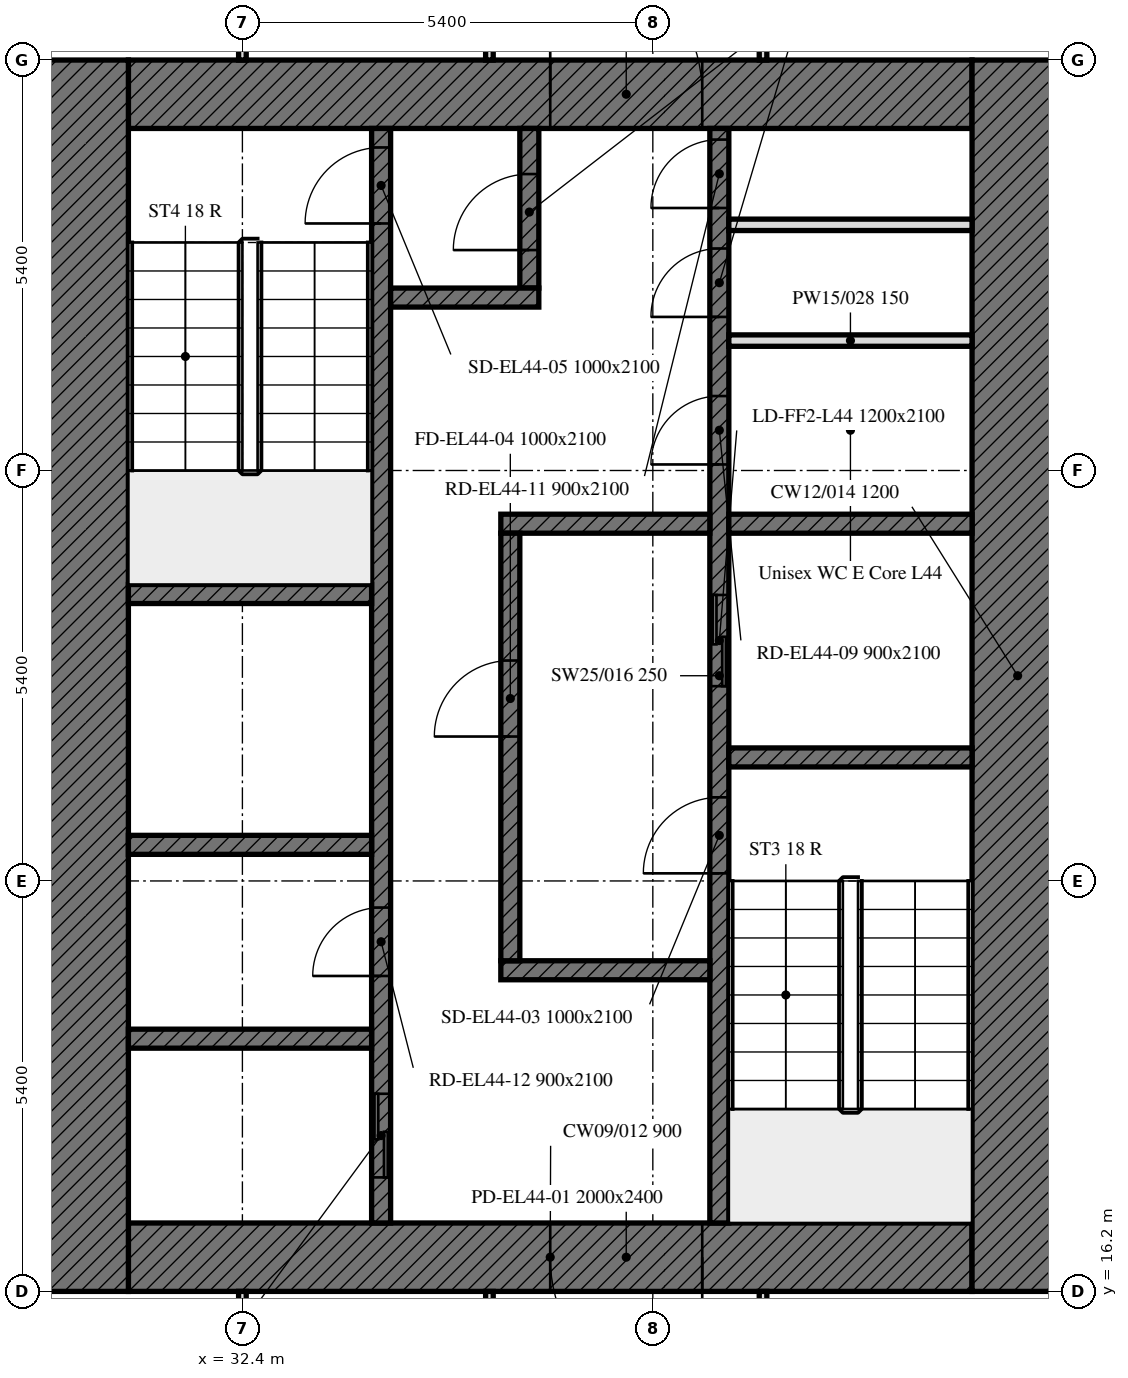
"""IFC4 building model, lengths in metres.
Left out: names, types, materials, properties, quantities, classifications, styles, units other than length and angle.
Written with IfcOpenShell. Run it as: python <this file> out.ifc"""

import sys

from ifc_helpers import new_model, si_unit, direction, frame, frame_2d, origin, place, context, subcontext, project, spatial, rectangle, extrude, element, fill, save


model = new_model("IFC4")
c1 = context("Model", 3, precision=1e-05, world=origin(), true_north=direction((0.0, 1.0)))
c2 = subcontext(c1, "Body", "Model", "MODEL_VIEW")
j1 = project(units=[si_unit("LENGTHUNIT", "METRE"), si_unit("PLANEANGLEUNIT", "RADIAN")], contexts=[c1])
p1 = place(None, origin())
s1 = spatial("IfcSite", under=j1, at=p1, CompositionType="ELEMENT")
p2 = place(p1, origin())
s2 = spatial("IfcBuilding", under=s1, at=p2, CompositionType="ELEMENT")
p3 = place(p2, frame((0.0, 0.0, 184.0)))
s3 = spatial("IfcBuildingStorey", under=s2, at=p3, CompositionType="ELEMENT", Elevation=184.0)
p4 = place(p3, frame((42.0, 16.65, 0.0), z_axis=(0.0, 0.0, 1.0), x_axis=(-1.0, 0.0, 0.0)))
e1 = element("IfcWall", 1, at=p4, inside=s3, PredefinedType="SOLIDWALL", context=c2, shape_type="SweptSolid", body=[
    extrude(rectangle(XDim=11.1, YDim=0.9, at=frame_2d((5.55, 0.0))), origin(), (0.0, 0.0, 1.0), 3.0),
])
p5 = place(p4, frame((3.55, 0.0, 0.0)))
e2 = element("IfcOpeningElement", 2, at=p5, cuts=e1, PredefinedType="OPENING", context=c2, shape_type="SweptSolid", body=[
    extrude(rectangle(XDim=2.0, YDim=2.4, at=frame_2d((1.0, 1.2))), frame((0.0, 0.45, 0.0), z_axis=(0.0, -1.0, 0.0), x_axis=(1.0, 0.0, 0.0)), (0.0, 0.0, 1.0), 0.9),
])
p6 = place(p3, frame((30.9, 31.95, 0.0), z_axis=(0.0, 0.0, 1.0), x_axis=(1.0, 0.0, 0.0)))
e3 = element("IfcWall", 3, at=p6, inside=s3, PredefinedType="SOLIDWALL", context=c2, shape_type="SweptSolid", body=[
    extrude(rectangle(XDim=11.1, YDim=0.9, at=frame_2d((5.55, 0.0))), origin(), (0.0, 0.0, 1.0), 3.0),
])
p7 = place(p6, frame((5.55, 0.0, 0.0)))
e4 = element("IfcOpeningElement", 4, at=p7, cuts=e3, PredefinedType="OPENING", context=c2, shape_type="SweptSolid", body=[
    extrude(rectangle(XDim=2.0, YDim=2.4, at=frame_2d((1.0, 1.2))), frame((0.0, 0.45, 0.0), z_axis=(0.0, -1.0, 0.0), x_axis=(1.0, 0.0, 0.0)), (0.0, 0.0, 1.0), 0.9),
])
for number, where, z_axis, x_axis in (
    (5, (42.6, 32.4, 0.0), (0.0, 0.0, 1.0), (0.0, -1.0, 0.0)),
    (6, (30.3, 16.2, 0.0), (0.0, 0.0, 1.0), (0.0, 1.0, 0.0)),
):
    element("IfcWall", number, at=place(p3, frame(where, z_axis=z_axis, x_axis=x_axis)), inside=s3, PredefinedType="SOLIDWALL", context=c2, shape_type="SweptSolid", body=[
        extrude(rectangle(XDim=16.2, YDim=1.2, at=frame_2d((8.1, 0.0))), origin(), (0.0, 0.0, 1.0), 3.0),
    ])
p8 = place(p3, frame((38.675, 17.1, 0.0), z_axis=(0.0, 0.0, 1.0), x_axis=(0.0, 1.0, 0.0)))
e7 = element("IfcWall", 7, at=p8, inside=s3, PredefinedType="SOLIDWALL", context=c2, shape_type="SweptSolid", body=[
    extrude(rectangle(XDim=14.4, YDim=0.25, at=frame_2d((7.2, 0.0))), origin(), (0.0, 0.0, 1.0), 3.0),
])
p9 = place(p8, frame((4.6, 0.0, 0.0)))
e8 = element("IfcOpeningElement", 8, at=p9, cuts=e7, PredefinedType="OPENING", context=c2, shape_type="SweptSolid", body=[
    extrude(rectangle(XDim=1.0, YDim=2.1, at=frame_2d((0.5, 1.05))), frame((0.0, 0.125, 0.0), z_axis=(0.0, -1.0, 0.0), x_axis=(1.0, 0.0, 0.0)), (0.0, 0.0, 1.0), 0.25),
])
p10 = place(p8, frame((7.062, 0.0, 0.0)))
e9 = element("IfcOpeningElement", 9, at=p10, cuts=e7, PredefinedType="OPENING", context=c2, shape_type="SweptSolid", body=[
    extrude(rectangle(XDim=1.2, YDim=2.1, at=frame_2d((0.6, 1.05))), frame((0.0, 0.125, 0.0), z_axis=(0.0, -1.0, 0.0), x_axis=(1.0, 0.0, 0.0)), (0.0, 0.0, 1.0), 0.25),
])
p11 = place(p8, frame((9.979, 0.0, 0.0)))
e10 = element("IfcOpeningElement", 10, at=p11, cuts=e7, PredefinedType="OPENING", context=c2, shape_type="SweptSolid", body=[
    extrude(rectangle(XDim=0.9, YDim=2.1, at=frame_2d((0.45, 1.05))), frame((0.0, 0.125, 0.0), z_axis=(0.0, -1.0, 0.0), x_axis=(1.0, 0.0, 0.0)), (0.0, 0.0, 1.0), 0.25),
])
p12 = place(p8, frame((11.92, 0.0, 0.0)))
e11 = element("IfcOpeningElement", 11, at=p12, cuts=e7, PredefinedType="OPENING", context=c2, shape_type="SweptSolid", body=[
    extrude(rectangle(XDim=0.9, YDim=2.1, at=frame_2d((0.45, 1.05))), frame((0.0, 0.125, 0.0), z_axis=(0.0, -1.0, 0.0), x_axis=(1.0, 0.0, 0.0)), (0.0, 0.0, 1.0), 0.25),
])
p13 = place(p8, frame((13.354, 0.0, 0.0)))
e12 = element("IfcOpeningElement", 12, at=p13, cuts=e7, PredefinedType="OPENING", context=c2, shape_type="SweptSolid", body=[
    extrude(rectangle(XDim=0.9, YDim=2.1, at=frame_2d((0.45, 1.05))), frame((0.0, 0.125, 0.0), z_axis=(0.0, -1.0, 0.0), x_axis=(1.0, 0.0, 0.0)), (0.0, 0.0, 1.0), 0.25),
])
p14 = place(p3, frame((34.225, 17.1, 0.0), z_axis=(0.0, 0.0, 1.0), x_axis=(0.0, 1.0, 0.0)))
e13 = element("IfcWall", 13, at=p14, inside=s3, PredefinedType="SOLIDWALL", context=c2, shape_type="SweptSolid", body=[
    extrude(rectangle(XDim=14.4, YDim=0.25, at=frame_2d((7.2, 0.0))), origin(), (0.0, 0.0, 1.0), 3.0),
])
p15 = place(p14, frame((13.15, 0.0, 0.0)))
e14 = element("IfcOpeningElement", 14, at=p15, cuts=e13, PredefinedType="OPENING", context=c2, shape_type="SweptSolid", body=[
    extrude(rectangle(XDim=1.0, YDim=2.1, at=frame_2d((0.5, 1.05))), frame((0.0, 0.125, 0.0), z_axis=(0.0, -1.0, 0.0), x_axis=(1.0, 0.0, 0.0)), (0.0, 0.0, 1.0), 0.25),
])
p16 = place(p14, frame((0.6, 0.0, 0.0)))
e15 = element("IfcOpeningElement", 15, at=p16, cuts=e13, PredefinedType="OPENING", context=c2, shape_type="SweptSolid", body=[
    extrude(rectangle(XDim=1.1, YDim=2.1, at=frame_2d((0.55, 1.05))), frame((0.0, 0.125, 0.0), z_axis=(0.0, -1.0, 0.0), x_axis=(1.0, 0.0, 0.0)), (0.0, 0.0, 1.0), 0.25),
])
p17 = place(p14, frame((3.25, 0.0, 0.0)))
e16 = element("IfcOpeningElement", 16, at=p17, cuts=e13, PredefinedType="OPENING", context=c2, shape_type="SweptSolid", body=[
    extrude(rectangle(XDim=0.9, YDim=2.1, at=frame_2d((0.45, 1.05))), frame((0.0, 0.125, 0.0), z_axis=(0.0, -1.0, 0.0), x_axis=(1.0, 0.0, 0.0)), (0.0, 0.0, 1.0), 0.25),
])
p18 = place(p3, frame((38.8, 23.225, 0.0), z_axis=(0.0, 0.0, 1.0), x_axis=(1.0, 0.0, 0.0)))
e17 = element("IfcWall", 17, at=p18, inside=s3, PredefinedType="SOLIDWALL", context=c2, shape_type="SweptSolid", body=[
    extrude(rectangle(XDim=3.2, YDim=0.25, at=frame_2d((1.6, 0.0))), origin(), (0.0, 0.0, 1.0), 3.0),
])
for number, where, z_axis, x_axis in (
    (18, (30.9, 25.375, 0.0), (0.0, 0.0, 1.0), (1.0, 0.0, 0.0)),
    (19, (30.9, 22.075, 0.0), (0.0, 0.0, 1.0), (1.0, 0.0, 0.0)),
):
    element("IfcWall", number, at=place(p3, frame(where, z_axis=z_axis, x_axis=x_axis)), inside=s3, PredefinedType="SOLIDWALL", context=c2, shape_type="SweptSolid", body=[
        extrude(rectangle(XDim=3.2, YDim=0.25, at=frame_2d((1.6, 0.0))), origin(), (0.0, 0.0, 1.0), 3.0),
    ])
p19 = place(p3, frame((38.8, 26.3, 0.0), z_axis=(0.0, 0.0, 1.0), x_axis=(1.0, 0.0, 0.0)))
e20 = element("IfcWall", 20, at=p19, inside=s3, PredefinedType="SOLIDWALL", context=c2, shape_type="SweptSolid", body=[
    extrude(rectangle(XDim=3.2, YDim=0.25, at=frame_2d((1.6, 0.0))), origin(), (0.0, 0.0, 1.0), 3.0),
])
for number, where, z_axis, x_axis in (
    (21, (35.8, 26.3, 0.0), (0.0, 0.0, 1.0), (1.0, 0.0, 0.0)),
    (22, (35.8, 20.425, 0.0), (0.0, 0.0, 1.0), (1.0, 0.0, 0.0)),
):
    element("IfcWall", number, at=place(p3, frame(where, z_axis=z_axis, x_axis=x_axis)), inside=s3, PredefinedType="SOLIDWALL", context=c2, shape_type="SweptSolid", body=[
        extrude(rectangle(XDim=2.75, YDim=0.25, at=frame_2d((1.375, 0.0))), origin(), (0.0, 0.0, 1.0), 3.0),
    ])
p20 = place(p3, frame((36.175, 29.4, 0.0), z_axis=(0.0, 0.0, 1.0), x_axis=(0.0, 1.0, 0.0)))
e23 = element("IfcWall", 23, at=p20, inside=s3, PredefinedType="SOLIDWALL", context=c2, shape_type="SweptSolid", body=[
    extrude(rectangle(XDim=2.1, YDim=0.25, at=frame_2d((1.05, 0.0))), origin(), (0.0, 0.0, 1.0), 3.0),
])
p21 = place(p20, frame((0.5, 0.0, 0.0)))
e24 = element("IfcOpeningElement", 24, at=p21, cuts=e23, PredefinedType="OPENING", context=c2, shape_type="SweptSolid", body=[
    extrude(rectangle(XDim=1.0, YDim=2.1, at=frame_2d((0.5, 1.05))), frame((0.0, 0.125, 0.0), z_axis=(0.0, -1.0, 0.0), x_axis=(1.0, 0.0, 0.0)), (0.0, 0.0, 1.0), 0.25),
])
p22 = place(p3, frame((34.35, 29.275, 0.0), z_axis=(0.0, 0.0, 1.0), x_axis=(1.0, 0.0, 0.0)))
e25 = element("IfcWall", 25, at=p22, inside=s3, PredefinedType="SOLIDWALL", context=c2, shape_type="SweptSolid", body=[
    extrude(rectangle(XDim=1.95, YDim=0.25, at=frame_2d((0.975, 0.0))), origin(), (0.0, 0.0, 1.0), 3.0),
])
p23 = place(p3, frame((35.925, 20.55, 0.0), z_axis=(0.0, 0.0, 1.0), x_axis=(0.0, 1.0, 0.0)))
e26 = element("IfcWall", 26, at=p23, inside=s3, PredefinedType="SOLIDWALL", context=c2, shape_type="SweptSolid", body=[
    extrude(rectangle(XDim=5.625, YDim=0.25, at=frame_2d((2.812, 0.0))), origin(), (0.0, 0.0, 1.0), 3.0),
])
p24 = place(p23, frame((2.95, 0.0, 0.0)))
e27 = element("IfcOpeningElement", 27, at=p24, cuts=e26, PredefinedType="OPENING", context=c2, shape_type="SweptSolid", body=[
    extrude(rectangle(XDim=1.0, YDim=2.1, at=frame_2d((0.5, 1.05))), frame((0.0, 0.125, 0.0), z_axis=(0.0, -1.0, 0.0), x_axis=(1.0, 0.0, 0.0)), (0.0, 0.0, 1.0), 0.25),
])
p25 = place(p3, frame((30.9, 19.525, 0.0), z_axis=(0.0, 0.0, 1.0), x_axis=(1.0, 0.0, 0.0)))
e28 = element("IfcWall", 28, at=p25, inside=s3, PredefinedType="SOLIDWALL", context=c2, shape_type="SweptSolid", body=[
    extrude(rectangle(XDim=3.2, YDim=0.25, at=frame_2d((1.6, 0.0))), origin(), (0.0, 0.0, 1.0), 3.0),
])
for number, where, z_axis, x_axis in (
    (29, (38.8, 28.709, 0.0), (0.0, 0.0, 1.0), (1.0, 0.0, 0.0)),
    (30, (38.8, 30.232, 0.0), (0.0, 0.0, 1.0), (1.0, 0.0, 0.0)),
):
    element("IfcWall", number, at=place(p3, frame(where, z_axis=z_axis, x_axis=x_axis)), inside=s3, PredefinedType="PARTITIONING", context=c2, shape_type="SweptSolid", body=[
        extrude(rectangle(XDim=3.2, YDim=0.15, at=frame_2d((1.6, 0.0))), origin(), (0.0, 0.0, 1.0), 3.0),
    ])
p26 = place(p3, frame((32.4, 32.4, 0.0), z_axis=(0.0, 0.0, 1.0), x_axis=(0.0, 1.0, 0.0)))
e31 = element("IfcWall", 31, at=p26, inside=s3, PredefinedType="PARTITIONING", context=c2, shape_type="SweptSolid", body=[
    extrude(rectangle(XDim=4.98, YDim=0.1, at=frame_2d((2.49, 0.0))), origin(), (0.0, 0.0, 1.0), 2.4),
])
for number, where, z_axis, x_axis in (
    (32, (35.65, 38.625, 0.0), (0.0, 0.0, 1.0), (0.0, -1.0, 0.0)),
    (33, (39.25, 32.4, 0.0), (0.0, 0.0, 1.0), (0.0, 1.0, 0.0)),
):
    element("IfcWall", number, at=place(p3, frame(where, z_axis=z_axis, x_axis=x_axis)), inside=s3, PredefinedType="PARTITIONING", context=c2, shape_type="SweptSolid", body=[
        extrude(rectangle(XDim=6.225, YDim=0.1, at=frame_2d((3.113, 0.0))), origin(), (0.0, 0.0, 1.0), 2.4),
    ])
for number, where, z_axis, x_axis in (
    (34, (32.4, 13.575, 0.0), (0.0, 0.0, 1.0), (0.0, 1.0, 0.0)),
    (35, (35.65, 16.2, 0.0), (0.0, 0.0, 1.0), (0.0, -1.0, 0.0)),
    (36, (39.25, 13.575, 0.0), (0.0, 0.0, 1.0), (0.0, 1.0, 0.0)),
):
    element("IfcWall", number, at=place(p3, frame(where, z_axis=z_axis, x_axis=x_axis)), inside=s3, PredefinedType="PARTITIONING", context=c2, shape_type="SweptSolid", body=[
        extrude(rectangle(XDim=2.625, YDim=0.1, at=frame_2d((1.312, 0.0))), origin(), (0.0, 0.0, 1.0), 3.0),
    ])
p27 = place(p5, origin())
e37 = element("IfcDoor", 37, at=p27, inside=s3, OperationType="DOUBLE_DOOR_SINGLE_SWING", PredefinedType="DOOR", context=c2, shape_type="SweptSolid", body=[
    extrude(rectangle(XDim=2.0, YDim=2.4, at=frame_2d((1.0, 1.2))), frame((0.0, 0.025, 0.0), z_axis=(0.0, -1.0, 0.0), x_axis=(1.0, 0.0, 0.0)), (0.0, 0.0, 1.0), 0.05),
])
fill(e2, e37)
p28 = place(p7, origin())
e38 = element("IfcDoor", 38, at=p28, inside=s3, OperationType="DOUBLE_DOOR_SINGLE_SWING", PredefinedType="DOOR", context=c2, shape_type="SweptSolid", body=[
    extrude(rectangle(XDim=2.0, YDim=2.4, at=frame_2d((1.0, 1.2))), frame((0.0, 0.025, 0.0), z_axis=(0.0, -1.0, 0.0), x_axis=(1.0, 0.0, 0.0)), (0.0, 0.0, 1.0), 0.05),
])
fill(e4, e38)
p29 = place(p9, origin())
e39 = element("IfcDoor", 39, at=p29, inside=s3, OperationType="SINGLE_SWING_LEFT", PredefinedType="DOOR", context=c2, shape_type="SweptSolid", body=[
    extrude(rectangle(XDim=1.0, YDim=2.1, at=frame_2d((0.5, 1.05))), frame((0.0, 0.025, 0.0), z_axis=(0.0, -1.0, 0.0), x_axis=(1.0, 0.0, 0.0)), (0.0, 0.0, 1.0), 0.05),
])
fill(e8, e39)
p30 = place(p24, origin())
e40 = element("IfcDoor", 40, at=p30, inside=s3, OperationType="SINGLE_SWING_LEFT", PredefinedType="DOOR", context=c2, shape_type="SweptSolid", body=[
    extrude(rectangle(XDim=1.0, YDim=2.1, at=frame_2d((0.5, 1.05))), frame((0.0, 0.025, 0.0), z_axis=(0.0, -1.0, 0.0), x_axis=(1.0, 0.0, 0.0)), (0.0, 0.0, 1.0), 0.05),
])
fill(e27, e40)
p31 = place(p15, origin())
e41 = element("IfcDoor", 41, at=p31, inside=s3, OperationType="SINGLE_SWING_LEFT", PredefinedType="DOOR", context=c2, shape_type="SweptSolid", body=[
    extrude(rectangle(XDim=1.0, YDim=2.1, at=frame_2d((0.5, 1.05))), frame((0.0, 0.025, 0.0), z_axis=(0.0, -1.0, 0.0), x_axis=(1.0, 0.0, 0.0)), (0.0, 0.0, 1.0), 0.05),
])
fill(e14, e41)
p32 = place(p21, origin())
e42 = element("IfcDoor", 42, at=p32, inside=s3, OperationType="SINGLE_SWING_LEFT", PredefinedType="DOOR", context=c2, shape_type="SweptSolid", body=[
    extrude(rectangle(XDim=1.0, YDim=2.1, at=frame_2d((0.5, 1.05))), frame((0.0, 0.025, 0.0), z_axis=(0.0, -1.0, 0.0), x_axis=(1.0, 0.0, 0.0)), (0.0, 0.0, 1.0), 0.05),
])
fill(e24, e42)
p33 = place(p10, origin())
e43 = element("IfcDoor", 43, at=p33, inside=s3, OperationType="DOUBLE_DOOR_SLIDING", PredefinedType="DOOR", context=c2, shape_type="SweptSolid", body=[
    extrude(rectangle(XDim=1.2, YDim=2.1, at=frame_2d((0.6, 1.05))), frame((0.0, 0.025, 0.0), z_axis=(0.0, -1.0, 0.0), x_axis=(1.0, 0.0, 0.0)), (0.0, 0.0, 1.0), 0.05),
])
fill(e9, e43)
p34 = place(p16, origin())
e44 = element("IfcDoor", 44, at=p34, inside=s3, OperationType="DOUBLE_DOOR_SLIDING", PredefinedType="DOOR", context=c2, shape_type="SweptSolid", body=[
    extrude(rectangle(XDim=1.1, YDim=2.1, at=frame_2d((0.55, 1.05))), frame((0.0, 0.025, 0.0), z_axis=(0.0, -1.0, 0.0), x_axis=(1.0, 0.0, 0.0)), (0.0, 0.0, 1.0), 0.05),
])
fill(e15, e44)
p35 = place(p11, origin())
e45 = element("IfcDoor", 45, at=p35, inside=s3, OperationType="SINGLE_SWING_LEFT", PredefinedType="DOOR", context=c2, shape_type="SweptSolid", body=[
    extrude(rectangle(XDim=0.9, YDim=2.1, at=frame_2d((0.45, 1.05))), frame((0.0, 0.025, 0.0), z_axis=(0.0, -1.0, 0.0), x_axis=(1.0, 0.0, 0.0)), (0.0, 0.0, 1.0), 0.05),
])
fill(e10, e45)
p36 = place(p12, origin())
e46 = element("IfcDoor", 46, at=p36, inside=s3, OperationType="SINGLE_SWING_LEFT", PredefinedType="DOOR", context=c2, shape_type="SweptSolid", body=[
    extrude(rectangle(XDim=0.9, YDim=2.1, at=frame_2d((0.45, 1.05))), frame((0.0, 0.025, 0.0), z_axis=(0.0, -1.0, 0.0), x_axis=(1.0, 0.0, 0.0)), (0.0, 0.0, 1.0), 0.05),
])
fill(e11, e46)
p37 = place(p13, origin())
e47 = element("IfcDoor", 47, at=p37, inside=s3, OperationType="SINGLE_SWING_LEFT", PredefinedType="DOOR", context=c2, shape_type="SweptSolid", body=[
    extrude(rectangle(XDim=0.9, YDim=2.1, at=frame_2d((0.45, 1.05))), frame((0.0, 0.025, 0.0), z_axis=(0.0, -1.0, 0.0), x_axis=(1.0, 0.0, 0.0)), (0.0, 0.0, 1.0), 0.05),
])
fill(e12, e47)
p38 = place(p17, origin())
e48 = element("IfcDoor", 48, at=p38, inside=s3, OperationType="SINGLE_SWING_LEFT", PredefinedType="DOOR", context=c2, shape_type="SweptSolid", body=[
    extrude(rectangle(XDim=0.9, YDim=2.1, at=frame_2d((0.45, 1.05))), frame((0.0, 0.025, 0.0), z_axis=(0.0, -1.0, 0.0), x_axis=(1.0, 0.0, 0.0)), (0.0, 0.0, 1.0), 0.05),
])
fill(e16, e48)
save(model, sys.argv[1])
